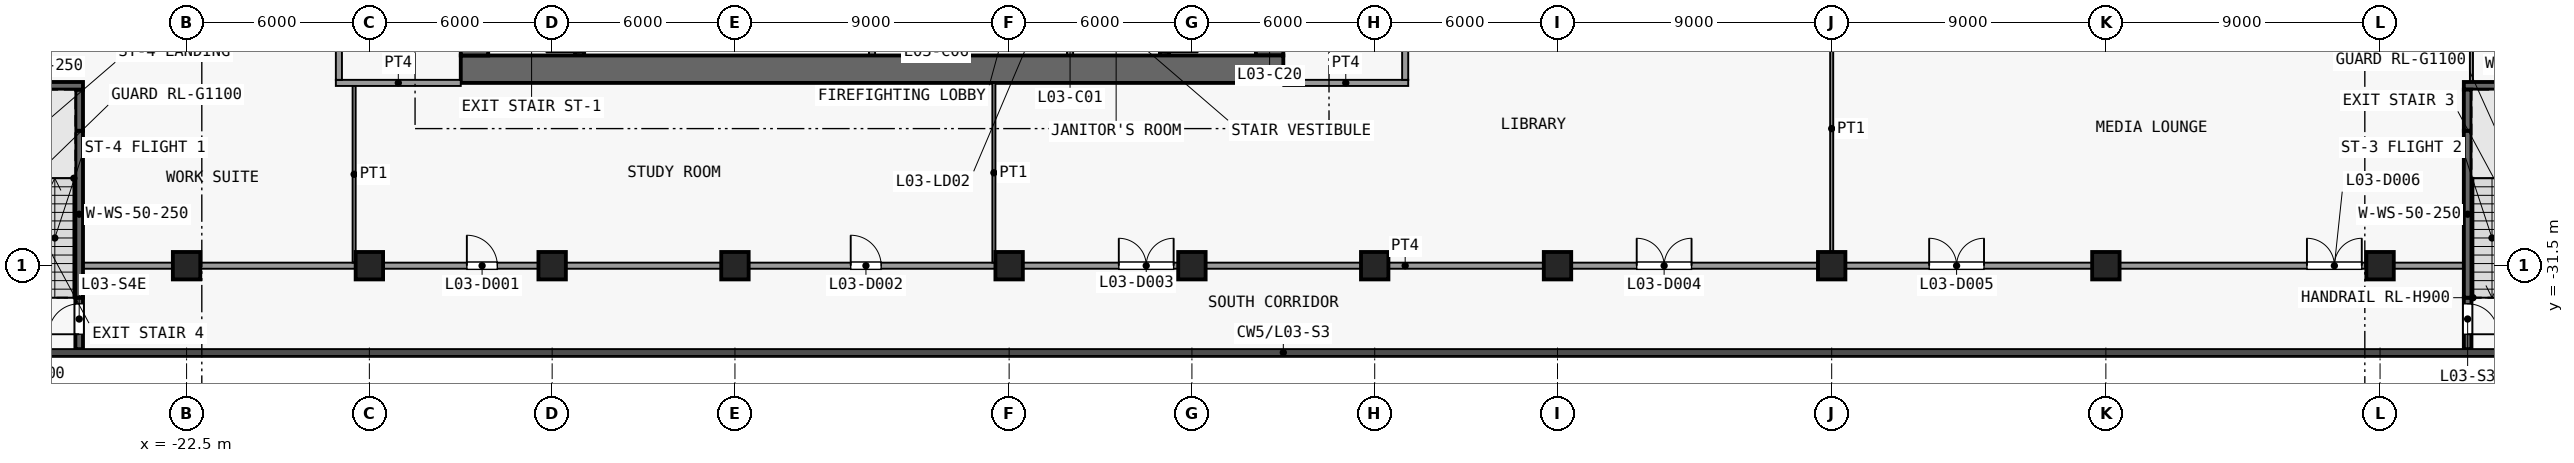
"""IFC4 building model, lengths in metres.
Left out: names, types, materials, properties, quantities, classifications, styles, units other than length and angle.
Written with IfcOpenShell. Run it as: python <this file> out.ifc"""

import sys

from ifc_helpers import new_model, si_unit, direction, frame, frame_2d, origin, origin_2d, place, context, subcontext, project, spatial, rectangle, extrude, element, fill, save


model = new_model("IFC4")
c1 = context("Model", 3, precision=1e-05, world=origin(), true_north=direction((0.0, 1.0)))
c2 = subcontext(c1, "Body", "Model", "MODEL_VIEW")
j1 = project(units=[si_unit("LENGTHUNIT", "METRE"), si_unit("PLANEANGLEUNIT", "RADIAN")], contexts=[c1])
p1 = place(None, origin())
s1 = spatial("IfcSite", under=j1, at=p1, CompositionType="ELEMENT")
p2 = place(p1, origin())
s2 = spatial("IfcBuilding", under=s1, at=p2, CompositionType="ELEMENT")
p3 = place(p2, frame((0.0, 0.0, 18.5)))
s3 = spatial("IfcBuildingStorey", under=s2, at=p3, CompositionType="ELEMENT", Elevation=18.5)
for number, where, z_axis, x_axis in (
    (1, (-22.5, -31.5, 0.0), (0.0, 0.0, 1.0), (1.0, 0.0, 0.0)),
    (2, (-16.5, -31.5, 0.0), (0.0, 0.0, 1.0), (1.0, 0.0, 0.0)),
    (3, (-10.5, -31.5, 0.0), (0.0, 0.0, 1.0), (1.0, 0.0, 0.0)),
    (4, (-4.5, -31.5, 0.0), (0.0, 0.0, 1.0), (1.0, 0.0, 0.0)),
    (5, (4.5, -31.5, 0.0), (0.0, 0.0, 1.0), (1.0, 0.0, 0.0)),
    (6, (10.5, -31.5, 0.0), (0.0, 0.0, 1.0), (1.0, 0.0, 0.0)),
    (7, (16.5, -31.5, 0.0), (0.0, 0.0, 1.0), (1.0, 0.0, 0.0)),
    (8, (22.5, -31.5, 0.0), (0.0, 0.0, 1.0), (1.0, 0.0, 0.0)),
    (9, (31.5, -31.5, 0.0), (0.0, 0.0, 1.0), (1.0, 0.0, 0.0)),
    (10, (40.5, -31.5, 0.0), (0.0, 0.0, 1.0), (1.0, 0.0, 0.0)),
    (11, (49.5, -31.5, 0.0), (0.0, 0.0, 1.0), (1.0, 0.0, 0.0)),
):
    element("IfcColumn", number, at=place(p3, frame(where, z_axis=z_axis, x_axis=x_axis)), inside=s3, PredefinedType="COLUMN", context=c2, shape_type="SweptSolid", body=[
        extrude(rectangle(XDim=0.9, YDim=0.9, at=origin_2d()), origin(), (0.0, 0.0, 1.0), 5.0),
    ])
p4 = place(p3, frame((-13.5, -25.05, 0.0), z_axis=(0.0, 0.0, 1.0), x_axis=(1.0, 0.0, 0.0)))
e12 = element("IfcWall", 12, at=p4, inside=s3, PredefinedType="SHEAR", context=c2, shape_type="SweptSolid", body=[
    extrude(rectangle(XDim=27.0, YDim=0.9, at=frame_2d((13.5, 0.0))), origin(), (0.0, 0.0, 1.0), 4.65),
])
p5 = place(p3, frame((-13.05, -8.5, 0.0), z_axis=(0.0, 0.0, 1.0), x_axis=(0.0, -1.0, 0.0)))
e13 = element("IfcWall", 13, at=p5, inside=s3, PredefinedType="SHEAR", context=c2, shape_type="SweptSolid", body=[
    extrude(rectangle(XDim=16.1, YDim=0.9, at=frame_2d((8.05, 0.0))), origin(), (0.0, 0.0, 1.0), 4.65),
])
p6 = place(p5, frame((14.8, 0.0, 0.0)))
e14 = element("IfcOpeningElement", 14, at=p6, cuts=e13, PredefinedType="OPENING", context=c2, shape_type="SweptSolid", body=[
    extrude(rectangle(XDim=1.1, YDim=2.1, at=frame_2d((0.55, 1.05))), frame((0.0, 0.46, 0.0), z_axis=(0.0, -1.0, 0.0), x_axis=(1.0, 0.0, 0.0)), (0.0, 0.0, 1.0), 0.92),
])
p7 = place(p3, frame((13.05, -24.6, 0.0), z_axis=(0.0, 0.0, 1.0), x_axis=(0.0, 1.0, 0.0)))
e15 = element("IfcWall", 15, at=p7, inside=s3, PredefinedType="SHEAR", context=c2, shape_type="SweptSolid", body=[
    extrude(rectangle(XDim=16.1, YDim=0.9, at=frame_2d((8.05, 0.0))), origin(), (0.0, 0.0, 1.0), 4.65),
])
p8 = place(p7, frame((0.2, 0.0, 0.0)))
e16 = element("IfcOpeningElement", 16, at=p8, cuts=e15, PredefinedType="OPENING", context=c2, shape_type="SweptSolid", body=[
    extrude(rectangle(XDim=1.1, YDim=2.1, at=frame_2d((0.55, 1.05))), frame((0.0, 0.46, 0.0), z_axis=(0.0, -1.0, 0.0), x_axis=(1.0, 0.0, 0.0)), (0.0, 0.0, 1.0), 0.92),
])
p9 = place(p3, frame((-9.6, -24.6, 0.0), z_axis=(0.0, 0.0, 1.0), x_axis=(0.0, 1.0, 0.0)))
e17 = element("IfcWall", 17, at=p9, inside=s3, PredefinedType="SHEAR", context=c2, shape_type="SweptSolid", body=[
    extrude(rectangle(XDim=7.7, YDim=0.3, at=frame_2d((3.85, 0.0))), origin(), (0.0, 0.0, 1.0), 4.65),
])
p10 = place(p9, frame((0.1, 0.0, 0.0)))
e18 = element("IfcOpeningElement", 18, at=p10, cuts=e17, PredefinedType="OPENING", context=c2, shape_type="SweptSolid", body=[
    extrude(rectangle(XDim=1.1, YDim=2.1, at=frame_2d((0.55, 1.05))), frame((0.0, 0.16, 0.0), z_axis=(0.0, -1.0, 0.0), x_axis=(1.0, 0.0, 0.0)), (0.0, 0.0, 1.0), 0.32),
])
p11 = place(p3, frame((0.0, -24.6, 0.0), z_axis=(0.0, 0.0, 1.0), x_axis=(0.0, 1.0, 0.0)))
e19 = element("IfcWall", 19, at=p11, inside=s3, PredefinedType="PARTITIONING", context=c2, shape_type="SweptSolid", body=[
    extrude(rectangle(XDim=2.05, YDim=0.2, at=frame_2d((1.025, 0.0))), origin(), (0.0, 0.0, 1.0), 4.65),
])
p12 = place(p3, frame((3.1, -24.6, 0.0), z_axis=(0.0, 0.0, 1.0), x_axis=(0.0, 1.0, 0.0)))
e20 = element("IfcWall", 20, at=p12, inside=s3, PredefinedType="PARTITIONING", context=c2, shape_type="SweptSolid", body=[
    extrude(rectangle(XDim=2.05, YDim=0.2, at=frame_2d((1.025, 0.0))), origin(), (0.0, 0.0, 1.0), 4.65),
])
p13 = place(p12, frame((0.65, 0.0, 0.0)))
e21 = element("IfcOpeningElement", 21, at=p13, cuts=e20, PredefinedType="OPENING", context=c2, shape_type="SweptSolid", body=[
    extrude(rectangle(XDim=0.9, YDim=2.1, at=frame_2d((0.45, 1.05))), frame((0.0, 0.11, 0.0), z_axis=(0.0, -1.0, 0.0), x_axis=(1.0, 0.0, 0.0)), (0.0, 0.0, 1.0), 0.22),
])
p14 = place(p3, frame((6.5, -22.55, 0.0), z_axis=(0.0, 0.0, 1.0), x_axis=(0.0, -1.0, 0.0)))
e22 = element("IfcWall", 22, at=p14, inside=s3, PredefinedType="PARTITIONING", context=c2, shape_type="SweptSolid", body=[
    extrude(rectangle(XDim=2.05, YDim=0.2, at=frame_2d((1.025, 0.0))), origin(), (0.0, 0.0, 1.0), 4.65),
])
p15 = place(p14, frame((0.35, 0.0, 0.0)))
e23 = element("IfcOpeningElement", 23, at=p15, cuts=e22, PredefinedType="OPENING", context=c2, shape_type="SweptSolid", body=[
    extrude(rectangle(XDim=1.2, YDim=2.1, at=frame_2d((0.6, 1.05))), frame((0.0, 0.11, 0.0), z_axis=(0.0, -1.0, 0.0), x_axis=(1.0, 0.0, 0.0)), (0.0, 0.0, 1.0), 0.22),
])
p16 = place(p3, frame((9.6, -16.9, 0.0), z_axis=(0.0, 0.0, 1.0), x_axis=(0.0, -1.0, 0.0)))
e24 = element("IfcWall", 24, at=p16, inside=s3, PredefinedType="SHEAR", context=c2, shape_type="SweptSolid", body=[
    extrude(rectangle(XDim=7.7, YDim=0.3, at=frame_2d((3.85, 0.0))), origin(), (0.0, 0.0, 1.0), 4.65),
])
p17 = place(p16, frame((6.5, 0.0, 0.0)))
e25 = element("IfcOpeningElement", 25, at=p17, cuts=e24, PredefinedType="OPENING", context=c2, shape_type="SweptSolid", body=[
    extrude(rectangle(XDim=1.1, YDim=2.1, at=frame_2d((0.55, 1.05))), frame((0.0, 0.16, 0.0), z_axis=(0.0, -1.0, 0.0), x_axis=(1.0, 0.0, 0.0)), (0.0, 0.0, 1.0), 0.32),
])
p18 = place(p3, frame((52.375, -32.55, 0.0), z_axis=(0.0, 0.0, 1.0), x_axis=(0.0, -1.0, 0.0)))
e26 = element("IfcWall", 26, at=p18, inside=s3, PredefinedType="SHEAR", context=c2, shape_type="SweptSolid", body=[
    extrude(rectangle(XDim=1.69, YDim=0.25, at=frame_2d((0.845, 0.0))), origin(), (0.0, 0.0, 1.0), 4.65),
])
p19 = place(p18, frame((0.2, 0.0, 0.0)))
e27 = element("IfcOpeningElement", 27, at=p19, cuts=e26, PredefinedType="OPENING", context=c2, shape_type="SweptSolid", body=[
    extrude(rectangle(XDim=1.0, YDim=2.1, at=frame_2d((0.5, 1.05))), frame((0.0, 0.135, 0.0), z_axis=(0.0, -1.0, 0.0), x_axis=(1.0, 0.0, 0.0)), (0.0, 0.0, 1.0), 0.27),
])
p20 = place(p3, frame((52.375, -32.55, 0.0), z_axis=(0.0, 0.0, 1.0), x_axis=(0.0, 1.0, 0.0)))
e28 = element("IfcWall", 28, at=p20, inside=s3, PredefinedType="SHEAR", context=c2, shape_type="SweptSolid", body=[
    extrude(rectangle(XDim=5.48, YDim=0.25, at=frame_2d((2.74, 0.0))), origin(), (0.0, 0.0, 1.0), 4.65),
])
p21 = place(p3, frame((52.375, -27.07, 0.0), z_axis=(0.0, 0.0, 1.0), x_axis=(0.0, 1.0, 0.0)))
e29 = element("IfcWall", 29, at=p21, inside=s3, PredefinedType="SHEAR", context=c2, shape_type="SweptSolid", body=[
    extrude(rectangle(XDim=1.35, YDim=0.25, at=frame_2d((0.675, 0.0))), origin(), (0.0, 0.0, 1.0), 4.65),
])
p22 = place(p3, frame((52.25, -25.595, 0.0), z_axis=(0.0, 0.0, 1.0), x_axis=(1.0, 0.0, 0.0)))
e30 = element("IfcWall", 30, at=p22, inside=s3, PredefinedType="SHEAR", context=c2, shape_type="SweptSolid", body=[
    extrude(rectangle(XDim=3.35, YDim=0.25, at=frame_2d((1.675, 0.0))), origin(), (0.0, 0.0, 1.0), 4.65),
])
p23 = place(p3, frame((-26.025, -34.24, 0.0), z_axis=(0.0, 0.0, 1.0), x_axis=(0.0, 1.0, 0.0)))
e31 = element("IfcWall", 31, at=p23, inside=s3, PredefinedType="SHEAR", context=c2, shape_type="SweptSolid", body=[
    extrude(rectangle(XDim=1.69, YDim=0.25, at=frame_2d((0.845, 0.0))), origin(), (0.0, 0.0, 1.0), 4.65),
])
p24 = place(p23, frame((0.49, 0.0, 0.0)))
e32 = element("IfcOpeningElement", 32, at=p24, cuts=e31, PredefinedType="OPENING", context=c2, shape_type="SweptSolid", body=[
    extrude(rectangle(XDim=1.0, YDim=2.1, at=frame_2d((0.5, 1.05))), frame((0.0, 0.135, 0.0), z_axis=(0.0, -1.0, 0.0), x_axis=(1.0, 0.0, 0.0)), (0.0, 0.0, 1.0), 0.27),
])
p25 = place(p3, frame((-26.025, -32.55, 0.0), z_axis=(0.0, 0.0, 1.0), x_axis=(0.0, 1.0, 0.0)))
e33 = element("IfcWall", 33, at=p25, inside=s3, PredefinedType="SHEAR", context=c2, shape_type="SweptSolid", body=[
    extrude(rectangle(XDim=5.48, YDim=0.25, at=frame_2d((2.74, 0.0))), origin(), (0.0, 0.0, 1.0), 4.65),
])
p26 = place(p3, frame((-26.025, -27.07, 0.0), z_axis=(0.0, 0.0, 1.0), x_axis=(0.0, 1.0, 0.0)))
e34 = element("IfcWall", 34, at=p26, inside=s3, PredefinedType="SHEAR", context=c2, shape_type="SweptSolid", body=[
    extrude(rectangle(XDim=1.35, YDim=0.25, at=frame_2d((0.675, 0.0))), origin(), (0.0, 0.0, 1.0), 4.65),
])
p27 = place(p3, frame((-29.25, -25.595, 0.0), z_axis=(0.0, 0.0, 1.0), x_axis=(1.0, 0.0, 0.0)))
e35 = element("IfcWall", 35, at=p27, inside=s3, PredefinedType="SHEAR", context=c2, shape_type="SweptSolid", body=[
    extrude(rectangle(XDim=3.35, YDim=0.25, at=frame_2d((1.675, 0.0))), origin(), (0.0, 0.0, 1.0), 4.65),
])
p28 = place(p3, frame((-25.9, -31.5, 0.0), z_axis=(0.0, 0.0, 1.0), x_axis=(1.0, 0.0, 0.0)))
e36 = element("IfcWall", 36, at=p28, inside=s3, PredefinedType="PARTITIONING", context=c2, shape_type="SweptSolid", body=[
    extrude(rectangle(XDim=78.15, YDim=0.2, at=frame_2d((39.075, 0.0))), origin(), (0.0, 0.0, 1.0), 4.65),
])
p29 = place(p28, frame((12.6, 0.0, 0.0)))
e37 = element("IfcOpeningElement", 37, at=p29, cuts=e36, PredefinedType="OPENING", context=c2, shape_type="SweptSolid", body=[
    extrude(rectangle(XDim=1.0, YDim=2.1, at=frame_2d((0.5, 1.05))), frame((0.0, 0.11, 0.0), z_axis=(0.0, -1.0, 0.0), x_axis=(1.0, 0.0, 0.0)), (0.0, 0.0, 1.0), 0.22),
])
p30 = place(p28, frame((25.2, 0.0, 0.0)))
e38 = element("IfcOpeningElement", 38, at=p30, cuts=e36, PredefinedType="OPENING", context=c2, shape_type="SweptSolid", body=[
    extrude(rectangle(XDim=1.0, YDim=2.1, at=frame_2d((0.5, 1.05))), frame((0.0, 0.11, 0.0), z_axis=(0.0, -1.0, 0.0), x_axis=(1.0, 0.0, 0.0)), (0.0, 0.0, 1.0), 0.22),
])
p31 = place(p28, frame((34.0, 0.0, 0.0)))
e39 = element("IfcOpeningElement", 39, at=p31, cuts=e36, PredefinedType="OPENING", context=c2, shape_type="SweptSolid", body=[
    extrude(rectangle(XDim=1.8, YDim=2.1, at=frame_2d((0.9, 1.05))), frame((0.0, 0.11, 0.0), z_axis=(0.0, -1.0, 0.0), x_axis=(1.0, 0.0, 0.0)), (0.0, 0.0, 1.0), 0.22),
])
p32 = place(p28, frame((51.0, 0.0, 0.0)))
e40 = element("IfcOpeningElement", 40, at=p32, cuts=e36, PredefinedType="OPENING", context=c2, shape_type="SweptSolid", body=[
    extrude(rectangle(XDim=1.8, YDim=2.1, at=frame_2d((0.9, 1.05))), frame((0.0, 0.11, 0.0), z_axis=(0.0, -1.0, 0.0), x_axis=(1.0, 0.0, 0.0)), (0.0, 0.0, 1.0), 0.22),
])
p33 = place(p28, frame((60.6, 0.0, 0.0)))
e41 = element("IfcOpeningElement", 41, at=p33, cuts=e36, PredefinedType="OPENING", context=c2, shape_type="SweptSolid", body=[
    extrude(rectangle(XDim=1.8, YDim=2.1, at=frame_2d((0.9, 1.05))), frame((0.0, 0.11, 0.0), z_axis=(0.0, -1.0, 0.0), x_axis=(1.0, 0.0, 0.0)), (0.0, 0.0, 1.0), 0.22),
])
p34 = place(p28, frame((73.0, 0.0, 0.0)))
e42 = element("IfcOpeningElement", 42, at=p34, cuts=e36, PredefinedType="OPENING", context=c2, shape_type="SweptSolid", body=[
    extrude(rectangle(XDim=1.8, YDim=2.1, at=frame_2d((0.9, 1.05))), frame((0.0, 0.11, 0.0), z_axis=(0.0, -1.0, 0.0), x_axis=(1.0, 0.0, 0.0)), (0.0, 0.0, 1.0), 0.22),
])
for number, where, z_axis, x_axis in (
    (43, (-17.6, -25.5, 0.0), (0.0, 0.0, 1.0), (1.0, 0.0, 0.0)),
    (44, (13.5, -25.5, 0.0), (0.0, 0.0, 1.0), (1.0, 0.0, 0.0)),
):
    element("IfcWall", number, at=place(p3, frame(where, z_axis=z_axis, x_axis=x_axis)), inside=s3, PredefinedType="PARTITIONING", context=c2, shape_type="SweptSolid", body=[
        extrude(rectangle(XDim=4.1, YDim=0.2, at=frame_2d((2.05, 0.0))), origin(), (0.0, 0.0, 1.0), 4.65),
    ])
p35 = place(p3, frame((-17.5, -25.4, 0.0), z_axis=(0.0, 0.0, 1.0), x_axis=(0.0, 1.0, 0.0)))
e45 = element("IfcWall", 45, at=p35, inside=s3, PredefinedType="PARTITIONING", context=c2, shape_type="SweptSolid", body=[
    extrude(rectangle(XDim=2.8, YDim=0.2, at=frame_2d((1.4, 0.0))), origin(), (0.0, 0.0, 1.0), 4.65),
])
p36 = place(p3, frame((-17.0, -31.4, 0.0), z_axis=(0.0, 0.0, 1.0), x_axis=(0.0, 1.0, 0.0)))
e46 = element("IfcWall", 46, at=p36, inside=s3, PredefinedType="PARTITIONING", context=c2, shape_type="SweptSolid", body=[
    extrude(rectangle(XDim=5.8, YDim=0.1, at=frame_2d((2.9, 0.0))), origin(), (0.0, 0.0, 1.0), 4.65),
])
p37 = place(p3, frame((4.0, -31.4, 0.0), z_axis=(0.0, 0.0, 1.0), x_axis=(0.0, 1.0, 0.0)))
e47 = element("IfcWall", 47, at=p37, inside=s3, PredefinedType="PARTITIONING", context=c2, shape_type="SweptSolid", body=[
    extrude(rectangle(XDim=5.9, YDim=0.1, at=frame_2d((2.95, 0.0))), origin(), (0.0, 0.0, 1.0), 4.65),
])
p38 = place(p3, frame((17.5, -25.4, 0.0), z_axis=(0.0, 0.0, 1.0), x_axis=(0.0, 1.0, 0.0)))
e48 = element("IfcWall", 48, at=p38, inside=s3, PredefinedType="PARTITIONING", context=c2, shape_type="SweptSolid", body=[
    extrude(rectangle(XDim=2.8, YDim=0.2, at=frame_2d((1.4, 0.0))), origin(), (0.0, 0.0, 1.0), 4.65),
])
p39 = place(p3, frame((31.5, -31.4, 0.0), z_axis=(0.0, 0.0, 1.0), x_axis=(0.0, 1.0, 0.0)))
e49 = element("IfcWall", 49, at=p39, inside=s3, PredefinedType="PARTITIONING", context=c2, shape_type="SweptSolid", body=[
    extrude(rectangle(XDim=8.8, YDim=0.1, at=frame_2d((4.4, 0.0))), origin(), (0.0, 0.0, 1.0), 4.65),
])
p40 = place(p3, frame((52.5, -25.47, 0.0), z_axis=(0.0, 0.0, 1.0), x_axis=(0.0, 1.0, 0.0)))
e50 = element("IfcWall", 50, at=p40, inside=s3, PredefinedType="PARTITIONING", context=c2, shape_type="SweptSolid", body=[
    extrude(rectangle(XDim=8.97, YDim=0.1, at=frame_2d((4.485, 0.0))), origin(), (0.0, 0.0, 1.0), 4.65),
])
p41 = place(p19, origin())
e51 = element("IfcDoor", 51, at=p41, inside=s3, OperationType="SINGLE_SWING_RIGHT", PredefinedType="DOOR", context=c2, shape_type="SweptSolid", body=[
    extrude(rectangle(XDim=1.0, YDim=2.1, at=frame_2d((0.5, 1.05))), frame((0.0, 0.025, 0.0), z_axis=(0.0, -1.0, 0.0), x_axis=(1.0, 0.0, 0.0)), (0.0, 0.0, 1.0), 0.05),
])
fill(e27, e51)
p42 = place(p24, origin())
e52 = element("IfcDoor", 52, at=p42, inside=s3, OperationType="SINGLE_SWING_LEFT", PredefinedType="DOOR", context=c2, shape_type="SweptSolid", body=[
    extrude(rectangle(XDim=1.0, YDim=2.1, at=frame_2d((0.5, 1.05))), frame((0.0, 0.025, 0.0), z_axis=(0.0, -1.0, 0.0), x_axis=(1.0, 0.0, 0.0)), (0.0, 0.0, 1.0), 0.05),
])
fill(e32, e52)
p43 = place(p29, origin())
e53 = element("IfcDoor", 53, at=p43, inside=s3, OperationType="SINGLE_SWING_RIGHT", PredefinedType="DOOR", context=c2, shape_type="SweptSolid", body=[
    extrude(rectangle(XDim=1.0, YDim=2.1, at=frame_2d((0.5, 1.05))), frame((0.0, 0.025, 0.0), z_axis=(0.0, -1.0, 0.0), x_axis=(1.0, 0.0, 0.0)), (0.0, 0.0, 1.0), 0.05),
])
fill(e37, e53)
p44 = place(p30, origin())
e54 = element("IfcDoor", 54, at=p44, inside=s3, OperationType="SINGLE_SWING_RIGHT", PredefinedType="DOOR", context=c2, shape_type="SweptSolid", body=[
    extrude(rectangle(XDim=1.0, YDim=2.1, at=frame_2d((0.5, 1.05))), frame((0.0, 0.025, 0.0), z_axis=(0.0, -1.0, 0.0), x_axis=(1.0, 0.0, 0.0)), (0.0, 0.0, 1.0), 0.05),
])
fill(e38, e54)
p45 = place(p31, origin())
e55 = element("IfcDoor", 55, at=p45, inside=s3, OperationType="DOUBLE_DOOR_SINGLE_SWING", PredefinedType="DOOR", context=c2, shape_type="SweptSolid", body=[
    extrude(rectangle(XDim=1.8, YDim=2.1, at=frame_2d((0.9, 1.05))), frame((0.0, 0.025, 0.0), z_axis=(0.0, -1.0, 0.0), x_axis=(1.0, 0.0, 0.0)), (0.0, 0.0, 1.0), 0.05),
])
fill(e39, e55)
p46 = place(p32, origin())
e56 = element("IfcDoor", 56, at=p46, inside=s3, OperationType="DOUBLE_DOOR_SINGLE_SWING", PredefinedType="DOOR", context=c2, shape_type="SweptSolid", body=[
    extrude(rectangle(XDim=1.8, YDim=2.1, at=frame_2d((0.9, 1.05))), frame((0.0, 0.025, 0.0), z_axis=(0.0, -1.0, 0.0), x_axis=(1.0, 0.0, 0.0)), (0.0, 0.0, 1.0), 0.05),
])
fill(e40, e56)
p47 = place(p33, origin())
e57 = element("IfcDoor", 57, at=p47, inside=s3, OperationType="DOUBLE_DOOR_SINGLE_SWING", PredefinedType="DOOR", context=c2, shape_type="SweptSolid", body=[
    extrude(rectangle(XDim=1.8, YDim=2.1, at=frame_2d((0.9, 1.05))), frame((0.0, 0.025, 0.0), z_axis=(0.0, -1.0, 0.0), x_axis=(1.0, 0.0, 0.0)), (0.0, 0.0, 1.0), 0.05),
])
fill(e41, e57)
p48 = place(p34, origin())
e58 = element("IfcDoor", 58, at=p48, inside=s3, OperationType="DOUBLE_DOOR_SINGLE_SWING", PredefinedType="DOOR", context=c2, shape_type="SweptSolid", body=[
    extrude(rectangle(XDim=1.8, YDim=2.1, at=frame_2d((0.9, 1.05))), frame((0.0, 0.025, 0.0), z_axis=(0.0, -1.0, 0.0), x_axis=(1.0, 0.0, 0.0)), (0.0, 0.0, 1.0), 0.05),
])
fill(e42, e58)
save(model, sys.argv[1])
